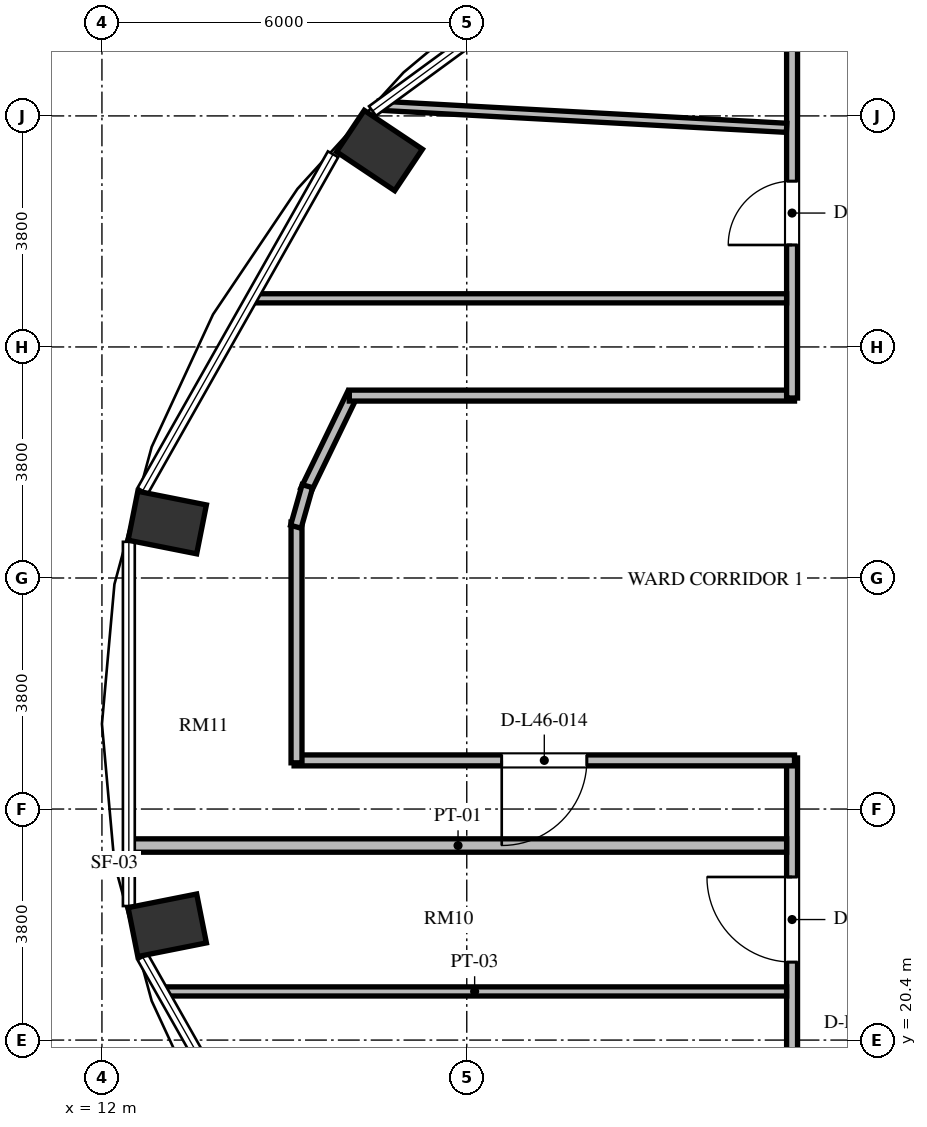
"""IFC4 building model, lengths in metres.
Left out: names, types, materials, properties, quantities, classifications, styles, units other than length and angle.
Written with IfcOpenShell. Run it as: python <this file> out.ifc"""

import sys

from ifc_helpers import new_model, si_unit, direction, frame, frame_2d, origin, origin_2d, place, context, subcontext, project, spatial, rectangle, extrude, element, fill, save


model = new_model("IFC4")
c1 = context("Model", 3, precision=1e-05, world=origin(), true_north=direction((0.0, 1.0)))
c2 = subcontext(c1, "Body", "Model", "MODEL_VIEW")
j1 = project(units=[si_unit("LENGTHUNIT", "METRE"), si_unit("PLANEANGLEUNIT", "RADIAN")], contexts=[c1])
p1 = place(None, origin())
s1 = spatial("IfcSite", under=j1, at=p1, CompositionType="ELEMENT")
p2 = place(p1, origin())
s2 = spatial("IfcBuilding", under=s1, at=p2, CompositionType="ELEMENT")
p3 = place(p2, frame((0.0, 0.0, 178.416)))
s3 = spatial("IfcBuildingStorey", under=s2, at=p3, CompositionType="ELEMENT", Elevation=178.416)
for number, where, z_axis, x_axis in (
    (1, (16.564, 35.031, 0.0), (0.0, 0.0, 1.0), (-0.831, 0.556, 0.0)),
    (2, (13.074, 28.912, 0.0), (0.0, 0.0, 1.0), (-0.981, 0.195, 0.0)),
    (3, (13.074, 22.288, 0.0), (0.0, 0.0, 1.0), (-0.981, -0.195, 0.0)),
):
    element("IfcColumn", number, at=place(p3, frame(where, z_axis=z_axis, x_axis=x_axis)), inside=s3, PredefinedType="COLUMN", context=c2, shape_type="SweptSolid", body=[
        extrude(rectangle(XDim=1.15, YDim=0.82, at=origin_2d()), origin(), (0.0, 0.0, 1.0), 3.648),
    ])
p4 = place(p3, frame((15.35, 29.436, 0.0), z_axis=(0.0, 0.0, 1.0), x_axis=(0.436196025907, 0.899851669434, 0.0)))
e4 = element("IfcWall", 4, at=p4, inside=s3, PredefinedType="PARTITIONING", context=c2, shape_type="SweptSolid", body=[
    extrude(rectangle(XDim=1.778, YDim=0.18, at=frame_2d((0.889, 0.0))), origin(), (0.0, 0.0, 1.0), 3.428),
])
p5 = place(p3, frame((16.068, 31.0, 0.0), z_axis=(0.0, 0.0, 1.0), x_axis=(1.0, 0.0, 0.0)))
e5 = element("IfcWall", 5, at=p5, inside=s3, PredefinedType="PARTITIONING", context=c2, shape_type="SweptSolid", body=[
    extrude(rectangle(XDim=7.322, YDim=0.18, at=frame_2d((3.661, 0.0))), origin(), (0.0, 0.0, 1.0), 3.428),
])
p6 = place(p3, frame((23.35, 30.96, 0.0), z_axis=(0.0, 0.0, 1.0), x_axis=(0.0, 1.0, 0.0)))
e6 = element("IfcWall", 6, at=p6, inside=s3, PredefinedType="PARTITIONING", context=c2, shape_type="SweptSolid", body=[
    extrude(rectangle(XDim=6.714, YDim=0.18, at=frame_2d((3.357, 0.0))), origin(), (0.0, 0.0, 1.0), 3.428),
])
p7 = place(p6, frame((2.517, 0.0, 0.0)))
e7 = element("IfcOpeningElement", 7, at=p7, cuts=e6, PredefinedType="OPENING", context=c2, shape_type="SweptSolid", body=[
    extrude(rectangle(XDim=1.05, YDim=2.15, at=frame_2d((0.525, 1.075))), frame((0.0, 0.1, 0.0), z_axis=(0.0, -1.0, 0.0), x_axis=(1.0, 0.0, 0.0)), (0.0, 0.0, 1.0), 0.2),
])
p8 = place(p3, frame((23.35, 19.98, 0.0), z_axis=(0.0, 0.0, 1.0), x_axis=(0.0, 1.0, 0.0)))
e8 = element("IfcWall", 8, at=p8, inside=s3, PredefinedType="PARTITIONING", context=c2, shape_type="SweptSolid", body=[
    extrude(rectangle(XDim=5.06, YDim=0.18, at=frame_2d((2.53, 0.0))), origin(), (0.0, 0.0, 1.0), 3.428),
])
p9 = place(p8, frame((1.702, 0.0, 0.0)))
e9 = element("IfcOpeningElement", 9, at=p9, cuts=e8, PredefinedType="OPENING", context=c2, shape_type="SweptSolid", body=[
    extrude(rectangle(XDim=1.4, YDim=2.2, at=frame_2d((0.7, 1.1))), frame((0.0, 0.1, 0.0), z_axis=(0.0, -1.0, 0.0), x_axis=(1.0, 0.0, 0.0)), (0.0, 0.0, 1.0), 0.2),
])
p10 = place(p3, frame((23.39, 25.0, 0.0), z_axis=(0.0, 0.0, 1.0), x_axis=(-1.0, 0.0, 0.0)))
e10 = element("IfcWall", 10, at=p10, inside=s3, PredefinedType="PARTITIONING", context=c2, shape_type="SweptSolid", body=[
    extrude(rectangle(XDim=8.23, YDim=0.18, at=frame_2d((4.115, 0.0))), origin(), (0.0, 0.0, 1.0), 3.428),
])
p11 = place(p10, frame((3.415, 0.0, 0.0)))
e11 = element("IfcOpeningElement", 11, at=p11, cuts=e10, PredefinedType="OPENING", context=c2, shape_type="SweptSolid", body=[
    extrude(rectangle(XDim=1.4, YDim=2.2, at=frame_2d((0.7, 1.1))), frame((0.0, 0.1, 0.0), z_axis=(0.0, -1.0, 0.0), x_axis=(1.0, 0.0, 0.0)), (0.0, 0.0, 1.0), 0.2),
])
p12 = place(p3, frame((15.2, 24.96, 0.0), z_axis=(0.0, 0.0, 1.0), x_axis=(0.0, 1.0, 0.0)))
e12 = element("IfcWall", 12, at=p12, inside=s3, PredefinedType="PARTITIONING", context=c2, shape_type="SweptSolid", body=[
    extrude(rectangle(XDim=3.961, YDim=0.18, at=frame_2d((1.98, 0.0))), origin(), (0.0, 0.0, 1.0), 3.428),
])
p13 = place(p3, frame((15.189, 28.843, 0.0), z_axis=(0.0, 0.0, 1.0), x_axis=(0.272862960331, 0.962052911684, 0.0)))
e13 = element("IfcWall", 13, at=p13, inside=s3, PredefinedType="PARTITIONING", context=c2, shape_type="SweptSolid", body=[
    extrude(rectangle(XDim=0.694, YDim=0.18, at=frame_2d((0.347, 0.0))), origin(), (0.0, 0.0, 1.0), 3.428),
])
p14 = place(p3, frame((12.999, 21.2, 0.0), z_axis=(0.0, 0.0, 1.0), x_axis=(1.0, 0.0, 0.0)))
e14 = element("IfcWall", 14, at=p14, inside=s3, PredefinedType="PARTITIONING", context=c2, shape_type="SweptSolid", body=[
    extrude(rectangle(XDim=10.261, YDim=0.15, at=frame_2d((5.131, 0.0))), origin(), (0.0, 0.0, 1.0), 2.863),
])
p15 = place(p3, frame((12.453, 23.6, 0.0), z_axis=(0.0, 0.0, 1.0), x_axis=(1.0, 0.0, 0.0)))
e15 = element("IfcWall", 15, at=p15, inside=s3, PredefinedType="PARTITIONING", context=c2, shape_type="SweptSolid", body=[
    extrude(rectangle(XDim=10.807, YDim=0.22, at=frame_2d((5.404, 0.0))), origin(), (0.0, 0.0, 1.0), 3.428),
])
p16 = place(p3, frame((14.469, 32.6, 0.0), z_axis=(0.0, 0.0, 1.0), x_axis=(1.0, 0.0, 0.0)))
e16 = element("IfcWall", 16, at=p16, inside=s3, PredefinedType="PARTITIONING", context=c2, shape_type="SweptSolid", body=[
    extrude(rectangle(XDim=8.791, YDim=0.15, at=frame_2d((4.396, 0.0))), origin(), (0.0, 0.0, 1.0), 3.428),
])
p17 = place(p3, frame((16.554, 35.768, 0.0), z_axis=(0.0, 0.0, 1.0), x_axis=(0.998529801792, -0.054205488039, 0.0)))
e17 = element("IfcWall", 17, at=p17, inside=s3, PredefinedType="PARTITIONING", context=c2, shape_type="SweptSolid", body=[
    extrude(rectangle(XDim=6.715, YDim=0.15, at=frame_2d((3.358, 0.0))), origin(), (0.0, 0.0, 1.0), 2.863),
])
p18 = place(p9, origin())
e18 = element("IfcDoor", 18, at=p18, inside=s3, OperationType="SINGLE_SWING_RIGHT", PredefinedType="DOOR", context=c2, shape_type="SweptSolid", body=[
    extrude(rectangle(XDim=1.4, YDim=2.2, at=frame_2d((0.7, 1.1))), frame((0.0, 0.025, 0.0), z_axis=(0.0, -1.0, 0.0), x_axis=(1.0, 0.0, 0.0)), (0.0, 0.0, 1.0), 0.05),
])
fill(e9, e18)
p19 = place(p7, origin())
e19 = element("IfcDoor", 19, at=p19, inside=s3, OperationType="SINGLE_SWING_LEFT", PredefinedType="DOOR", context=c2, shape_type="SweptSolid", body=[
    extrude(rectangle(XDim=1.05, YDim=2.15, at=frame_2d((0.525, 1.075))), frame((0.0, 0.025, 0.0), z_axis=(0.0, -1.0, 0.0), x_axis=(1.0, 0.0, 0.0)), (0.0, 0.0, 1.0), 0.05),
])
fill(e7, e19)
p20 = place(p11, origin())
e20 = element("IfcDoor", 20, at=p20, inside=s3, OperationType="SINGLE_SWING_RIGHT", PredefinedType="DOOR", context=c2, shape_type="SweptSolid", body=[
    extrude(rectangle(XDim=1.4, YDim=2.2, at=frame_2d((0.7, 1.1))), frame((0.0, 0.025, 0.0), z_axis=(0.0, -1.0, 0.0), x_axis=(1.0, 0.0, 0.0)), (0.0, 0.0, 1.0), 0.05),
])
fill(e11, e20)
save(model, sys.argv[1])
